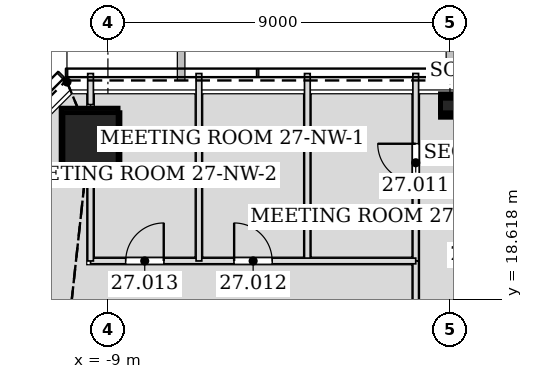
"""IFC4 building model, lengths in metres.
Left out: names, types, materials, properties, quantities, classifications, styles, units other than length and angle.
Written with IfcOpenShell. Run it as: python <this file> out.ifc"""

import sys

from ifc_helpers import new_model, si_unit, direction, frame, frame_2d, origin, origin_2d, place, context, subcontext, project, spatial, rectangle, hollow_rectangle, extrude, element, fill, save


model = new_model("IFC4")
c1 = context("Model", 3, precision=1e-05, world=origin(), true_north=direction((0.0, 1.0)))
c2 = subcontext(c1, "Body", "Model", "MODEL_VIEW")
j1 = project(units=[si_unit("LENGTHUNIT", "METRE"), si_unit("PLANEANGLEUNIT", "RADIAN")], contexts=[c1])
p1 = place(None, origin())
s1 = spatial("IfcSite", under=j1, at=p1, CompositionType="ELEMENT")
p2 = place(p1, origin())
s2 = spatial("IfcBuilding", under=s1, at=p2, CompositionType="ELEMENT")
p3 = place(p2, frame((0.0, 0.0, 121.8)))
s3 = spatial("IfcBuildingStorey", under=s2, at=p3, CompositionType="ELEMENT", Elevation=121.8)
p4 = place(p3, frame((-9.482, 22.891, 0.0), z_axis=(0.011678552323, -0.028237693676, 0.999533012997), x_axis=(0.924086310396, 0.382183844423, 0.0)))
e1 = element("IfcColumn", 1, at=p4, inside=s3, PredefinedType="COLUMN", context=c2, shape_type="SweptSolid", body=[
    extrude(hollow_rectangle(XDim=1.5, YDim=1.5, WallThickness=0.07, at=origin_2d()), origin(), (0.0, 0.0, 1.0), 4.202),
])
p5 = place(p3, frame((0.0, 23.769, 0.0), z_axis=(0.0, -0.028239619523, 0.999601182417), x_axis=(1.0, 0.0, 0.0)))
e2 = element("IfcColumn", 2, at=p5, inside=s3, PredefinedType="COLUMN", context=c2, shape_type="SweptSolid", body=[
    extrude(hollow_rectangle(XDim=0.5, YDim=0.5, WallThickness=0.025, at=origin_2d()), origin(), (0.0, 0.0, 1.0), 4.202),
])
p6 = place(p3, frame((-0.9, 24.553, 0.0), z_axis=(0.0, 0.0, 1.0), x_axis=(0.0, -1.0, 0.0)))
e3 = element("IfcWall", 3, at=p6, inside=s3, PredefinedType="PARTITIONING", context=c2, shape_type="SweptSolid", body=[
    extrude(rectangle(XDim=4.935, YDim=0.15, at=frame_2d((2.468, 0.0))), origin(), (0.0, 0.0, 1.0), 3.491),
])
p7 = place(p6, frame((1.85, 0.0, 0.0)))
e4 = element("IfcOpeningElement", 4, at=p7, cuts=e3, PredefinedType="OPENING", context=c2, shape_type="SweptSolid", body=[
    extrude(rectangle(XDim=1.0, YDim=2.1, at=frame_2d((0.5, 1.05))), frame((0.0, 0.085, 0.0), z_axis=(0.0, -1.0, 0.0), x_axis=(1.0, 0.0, 0.0)), (0.0, 0.0, 1.0), 0.17),
])
p8 = place(p3, frame((-0.9, 19.62, 0.0), z_axis=(0.0, 0.0, 1.0), x_axis=(0.0, -1.0, 0.0)))
e5 = element("IfcWall", 5, at=p8, inside=s3, PredefinedType="PARTITIONING", context=c2, shape_type="SweptSolid", body=[
    extrude(rectangle(XDim=6.57, YDim=0.15, at=frame_2d((3.285, 0.0))), origin(), (0.0, 0.0, 1.0), 3.426),
])
p9 = place(p3, frame((-3.752, 24.551, 0.0), z_axis=(0.0, 0.0, 1.0), x_axis=(0.0, -1.0, 0.0)))
e6 = element("IfcWall", 6, at=p9, inside=s3, PredefinedType="PARTITIONING", context=c2, shape_type="SweptSolid", body=[
    extrude(rectangle(XDim=4.932, YDim=0.15, at=frame_2d((2.466, 0.0))), origin(), (0.0, 0.0, 1.0), 3.491),
])
p10 = place(p3, frame((-0.9, 19.619, 0.0), z_axis=(0.0, 0.0, 1.0), x_axis=(-1.0, 0.0, 0.0)))
e7 = element("IfcWall", 7, at=p10, inside=s3, PredefinedType="PARTITIONING", context=c2, shape_type="SweptSolid", body=[
    extrude(rectangle(XDim=8.557, YDim=0.15, at=frame_2d((4.279, 0.0))), origin(), (0.0, 0.0, 1.0), 4.035),
])
p11 = place(p10, frame((3.779, 0.0, 0.0)))
e8 = element("IfcOpeningElement", 8, at=p11, cuts=e7, PredefinedType="OPENING", context=c2, shape_type="SweptSolid", body=[
    extrude(rectangle(XDim=1.0, YDim=2.1, at=frame_2d((0.5, 1.05))), frame((0.0, 0.085, 0.0), z_axis=(0.0, -1.0, 0.0), x_axis=(1.0, 0.0, 0.0)), (0.0, 0.0, 1.0), 0.17),
])
p12 = place(p10, frame((6.631, 0.0, 0.0)))
e9 = element("IfcOpeningElement", 9, at=p12, cuts=e7, PredefinedType="OPENING", context=c2, shape_type="SweptSolid", body=[
    extrude(rectangle(XDim=1.0, YDim=2.1, at=frame_2d((0.5, 1.05))), frame((0.0, 0.085, 0.0), z_axis=(0.0, -1.0, 0.0), x_axis=(1.0, 0.0, 0.0)), (0.0, 0.0, 1.0), 0.17),
])
p13 = place(p3, frame((-6.605, 24.551, 0.0), z_axis=(0.0, 0.0, 1.0), x_axis=(0.0, -1.0, 0.0)))
e10 = element("IfcWall", 10, at=p13, inside=s3, PredefinedType="PARTITIONING", context=c2, shape_type="SweptSolid", body=[
    extrude(rectangle(XDim=4.932, YDim=0.15, at=frame_2d((2.466, 0.0))), origin(), (0.0, 0.0, 1.0), 3.491),
])
p14 = place(p3, frame((-9.457, 24.551, 0.0), z_axis=(0.0, 0.0, 1.0), x_axis=(0.0, -1.0, 0.0)))
e11 = element("IfcWall", 11, at=p14, inside=s3, PredefinedType="PARTITIONING", context=c2, shape_type="SweptSolid", body=[
    extrude(rectangle(XDim=0.817, YDim=0.15, at=frame_2d((0.409, 0.0))), origin(), (0.0, 0.0, 1.0), 4.035),
])
p15 = place(p3, frame((-9.457, 21.929, 0.0), z_axis=(0.0, 0.0, 1.0), x_axis=(0.0, -1.0, 0.0)))
e12 = element("IfcWall", 12, at=p15, inside=s3, PredefinedType="PARTITIONING", context=c2, shape_type="SweptSolid", body=[
    extrude(rectangle(XDim=2.31, YDim=0.15, at=frame_2d((1.155, 0.0))), origin(), (0.0, 0.0, 1.0), 3.042),
])
p16 = place(p7, frame((1.0, 0.0, 0.0), z_axis=(0.0, 0.0, 1.0), x_axis=(-1.0, 0.0, 0.0)))
e13 = element("IfcDoor", 13, at=p16, inside=s3, OperationType="SINGLE_SWING_RIGHT", PredefinedType="DOOR", context=c2, shape_type="SweptSolid", body=[
    extrude(rectangle(XDim=1.0, YDim=2.1, at=frame_2d((0.5, 1.05))), frame((0.0, 0.025, 0.0), z_axis=(0.0, -1.0, 0.0), x_axis=(1.0, 0.0, 0.0)), (0.0, 0.0, 1.0), 0.05),
])
fill(e4, e13)
p17 = place(p11, frame((1.0, 0.0, 0.0), z_axis=(0.0, 0.0, 1.0), x_axis=(-1.0, 0.0, 0.0)))
e14 = element("IfcDoor", 14, at=p17, inside=s3, OperationType="SINGLE_SWING_LEFT", PredefinedType="DOOR", context=c2, shape_type="SweptSolid", body=[
    extrude(rectangle(XDim=1.0, YDim=2.1, at=frame_2d((0.5, 1.05))), frame((0.0, 0.025, 0.0), z_axis=(0.0, -1.0, 0.0), x_axis=(1.0, 0.0, 0.0)), (0.0, 0.0, 1.0), 0.05),
])
fill(e8, e14)
p18 = place(p12, frame((1.0, 0.0, 0.0), z_axis=(0.0, 0.0, 1.0), x_axis=(-1.0, 0.0, 0.0)))
e15 = element("IfcDoor", 15, at=p18, inside=s3, OperationType="SINGLE_SWING_RIGHT", PredefinedType="DOOR", context=c2, shape_type="SweptSolid", body=[
    extrude(rectangle(XDim=1.0, YDim=2.1, at=frame_2d((0.5, 1.05))), frame((0.0, 0.025, 0.0), z_axis=(0.0, -1.0, 0.0), x_axis=(1.0, 0.0, 0.0)), (0.0, 0.0, 1.0), 0.05),
])
fill(e9, e15)
save(model, sys.argv[1])
